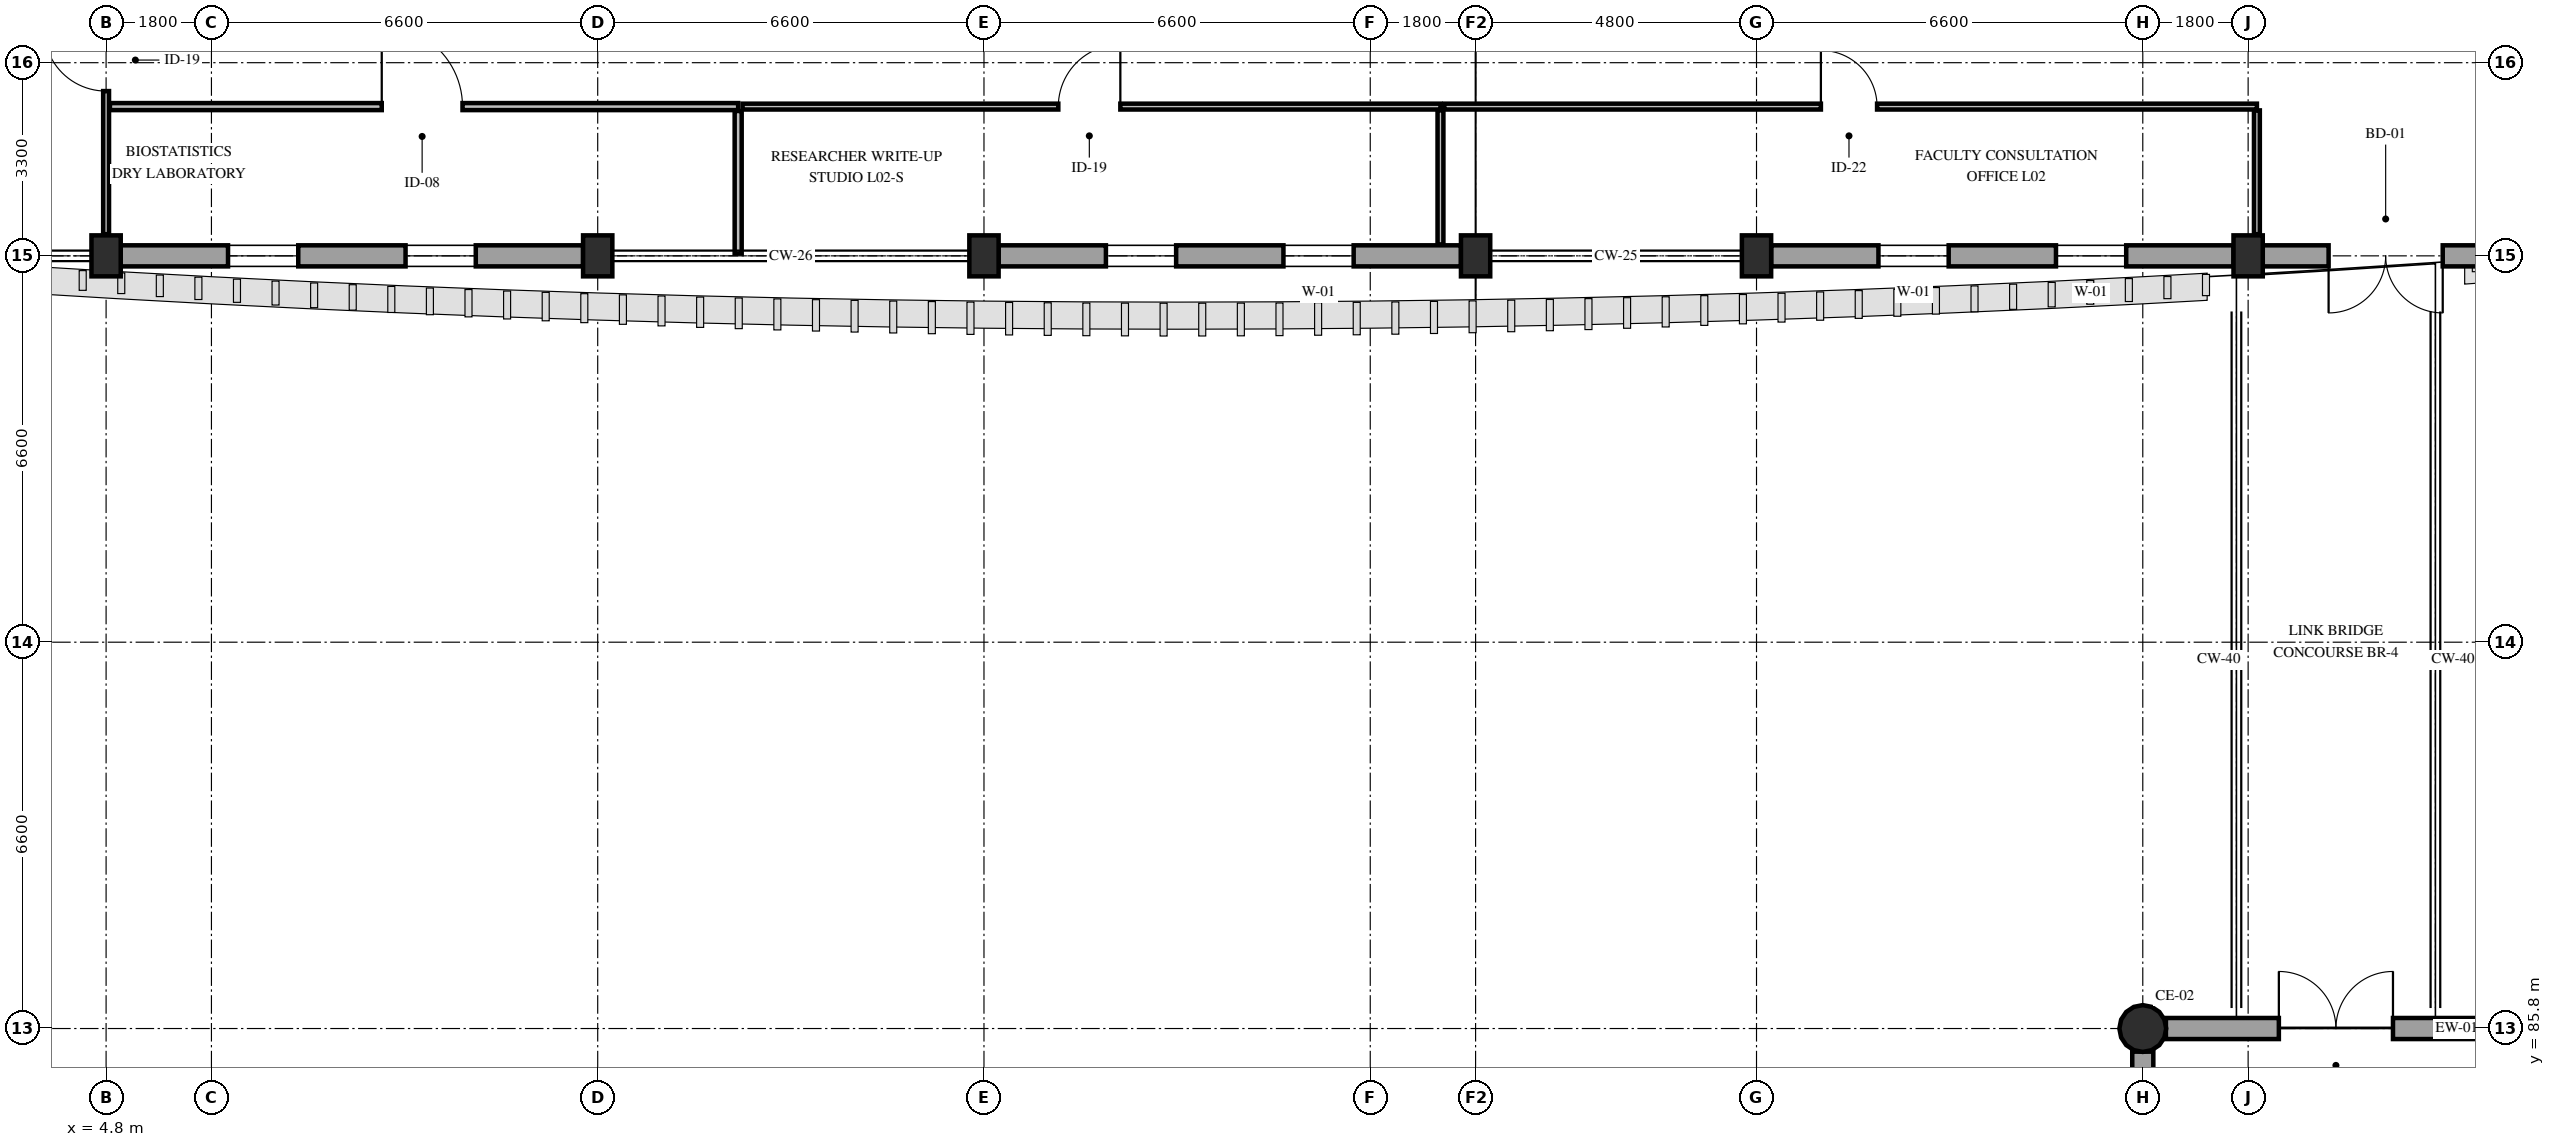
"""IFC4 building model, lengths in metres.
Left out: names, types, materials, properties, quantities, classifications, styles, units other than length and angle.
Written with IfcOpenShell. Run it as: python <this file> out.ifc"""

import sys

from ifc_helpers import new_model, si_unit, direction, frame, frame_2d, origin, origin_2d, place, context, subcontext, project, spatial, rectangle, circle, extrude, element, fill, save


model = new_model("IFC4")
c1 = context("Model", 3, precision=1e-05, world=origin(), true_north=direction((0.0, 1.0)))
c2 = subcontext(c1, "Body", "Model", "MODEL_VIEW")
j1 = project(units=[si_unit("LENGTHUNIT", "METRE"), si_unit("PLANEANGLEUNIT", "RADIAN")], contexts=[c1])
p1 = place(None, origin())
s1 = spatial("IfcSite", under=j1, at=p1, CompositionType="ELEMENT")
p2 = place(p1, origin())
s2 = spatial("IfcBuilding", under=s1, at=p2, CompositionType="ELEMENT")
p3 = place(p2, frame((0.0, 0.0, 10.2)))
s3 = spatial("IfcBuildingStorey", under=s2, at=p3, CompositionType="ELEMENT", Elevation=10.2)
for number, where, z_axis, x_axis in (
    (1, (4.8, 99.0, 0.0), (0.0, 0.0, 1.0), (1.0, 0.0, 0.0)),
    (2, (13.2, 99.0, 0.0), (0.0, 0.0, 1.0), (1.0, 0.0, 0.0)),
    (3, (19.8, 99.0, 0.0), (0.0, 0.0, 1.0), (1.0, 0.0, 0.0)),
    (4, (28.2, 99.0, 0.0), (0.0, 0.0, 1.0), (1.0, 0.0, 0.0)),
    (5, (33.0, 99.0, 0.0), (0.0, 0.0, 1.0), (1.0, 0.0, 0.0)),
    (6, (41.4, 99.0, 0.0), (0.0, 0.0, 1.0), (1.0, 0.0, 0.0)),
):
    element("IfcColumn", number, at=place(p3, frame(where, z_axis=z_axis, x_axis=x_axis)), inside=s3, PredefinedType="PILASTER", context=c2, shape_type="SweptSolid", body=[
        extrude(rectangle(XDim=0.5, YDim=0.7, at=origin_2d()), origin(), (0.0, 0.0, 1.0), 4.8),
    ])
p4 = place(p3, frame((39.6, 85.8, 0.0), z_axis=(0.0, 0.0, 1.0), x_axis=(1.0, 0.0, 0.0)))
e7 = element("IfcColumn", 7, at=p4, inside=s3, PredefinedType="COLUMN", context=c2, shape_type="SweptSolid", body=[
    extrude(circle(Radius=0.4, at=origin_2d()), origin(), (0.0, 0.0, 1.0), 4.8),
])
p5 = place(p3, frame((39.6, 79.595, 0.0), z_axis=(0.0, 0.0, 1.0), x_axis=(0.0, 1.0, 0.0)))
e8 = element("IfcWall", 8, at=p5, inside=s3, PredefinedType="STANDARD", context=c2, shape_type="SweptSolid", body=[
    extrude(rectangle(XDim=5.81, YDim=0.36, at=frame_2d((2.905, 0.0))), origin(), (0.0, 0.0, 1.0), 3.95),
])
p6 = place(p5, frame((1.405, 0.0, 0.85)))
e9 = element("IfcOpeningElement", 9, at=p6, cuts=e8, PredefinedType="OPENING", context=c2, shape_type="SweptSolid", body=[
    extrude(rectangle(XDim=3.0, YDim=1.5, at=frame_2d((1.5, 0.75))), frame((0.0, 0.195, 0.0), z_axis=(0.0, -1.0, 0.0), x_axis=(1.0, 0.0, 0.0)), (0.0, 0.0, 1.0), 0.39),
])
p7 = place(p3, frame((39.995, 85.8, 0.0), z_axis=(0.0, 0.0, 1.0), x_axis=(1.0, 0.0, 0.0)))
e10 = element("IfcWall", 10, at=p7, inside=s3, PredefinedType="STANDARD", context=c2, shape_type="SweptSolid", body=[
    extrude(rectangle(XDim=5.81, YDim=0.36, at=frame_2d((2.905, 0.0))), origin(), (0.0, 0.0, 1.0), 3.95),
])
p8 = place(p7, frame((1.93, 0.0, 0.0)))
e11 = element("IfcOpeningElement", 11, at=p8, cuts=e10, PredefinedType="OPENING", context=c2, shape_type="SweptSolid", body=[
    extrude(rectangle(XDim=1.95, YDim=2.35, at=frame_2d((0.975, 1.175))), frame((0.0, 0.195, 0.0), z_axis=(0.0, -1.0, 0.0), x_axis=(1.0, 0.0, 0.0)), (0.0, 0.0, 1.0), 0.39),
])
p9 = place(p3, frame((45.85, 99.0, 0.0), z_axis=(0.0, 0.0, 1.0), x_axis=(-1.0, 0.0, 0.0)))
e12 = element("IfcWall", 12, at=p9, inside=s3, PredefinedType="STANDARD", context=c2, shape_type="SweptSolid", body=[
    extrude(rectangle(XDim=4.2, YDim=0.36, at=frame_2d((2.1, 0.0))), origin(), (0.0, 0.0, 1.0), 3.95),
])
p10 = place(p9, frame((1.125, 0.0, 0.0)))
e13 = element("IfcOpeningElement", 13, at=p10, cuts=e12, PredefinedType="OPENING", context=c2, shape_type="SweptSolid", body=[
    extrude(rectangle(XDim=1.95, YDim=2.35, at=frame_2d((0.975, 1.175))), frame((0.0, 0.195, 0.0), z_axis=(0.0, -1.0, 0.0), x_axis=(1.0, 0.0, 0.0)), (0.0, 0.0, 1.0), 0.39),
])
p11 = place(p3, frame((41.15, 99.0, 0.0), z_axis=(0.0, 0.0, 1.0), x_axis=(-1.0, 0.0, 0.0)))
e14 = element("IfcWall", 14, at=p11, inside=s3, PredefinedType="STANDARD", context=c2, shape_type="SweptSolid", body=[
    extrude(rectangle(XDim=7.9, YDim=0.36, at=frame_2d((3.95, 0.0))), origin(), (0.0, 0.0, 1.0), 3.93),
])
p12 = place(p11, frame((1.833, 0.0, 0.85)))
e15 = element("IfcOpeningElement", 15, at=p12, cuts=e14, PredefinedType="OPENING", context=c2, shape_type="SweptSolid", body=[
    extrude(rectangle(XDim=1.2, YDim=1.5, at=frame_2d((0.6, 0.75))), frame((0.0, 0.195, 0.0), z_axis=(0.0, -1.0, 0.0), x_axis=(1.0, 0.0, 0.0)), (0.0, 0.0, 1.0), 0.39),
])
p13 = place(p11, frame((4.867, 0.0, 0.85)))
e16 = element("IfcOpeningElement", 16, at=p13, cuts=e14, PredefinedType="OPENING", context=c2, shape_type="SweptSolid", body=[
    extrude(rectangle(XDim=1.2, YDim=1.5, at=frame_2d((0.6, 0.75))), frame((0.0, 0.195, 0.0), z_axis=(0.0, -1.0, 0.0), x_axis=(1.0, 0.0, 0.0)), (0.0, 0.0, 1.0), 0.39),
])
p14 = place(p3, frame((27.95, 99.0, 0.0), z_axis=(0.0, 0.0, 1.0), x_axis=(-1.0, 0.0, 0.0)))
e17 = element("IfcWall", 17, at=p14, inside=s3, PredefinedType="STANDARD", context=c2, shape_type="SweptSolid", body=[
    extrude(rectangle(XDim=7.9, YDim=0.36, at=frame_2d((3.95, 0.0))), origin(), (0.0, 0.0, 1.0), 3.93),
])
p15 = place(p14, frame((1.833, 0.0, 0.85)))
e18 = element("IfcOpeningElement", 18, at=p15, cuts=e17, PredefinedType="OPENING", context=c2, shape_type="SweptSolid", body=[
    extrude(rectangle(XDim=1.2, YDim=1.5, at=frame_2d((0.6, 0.75))), frame((0.0, 0.195, 0.0), z_axis=(0.0, -1.0, 0.0), x_axis=(1.0, 0.0, 0.0)), (0.0, 0.0, 1.0), 0.39),
])
p16 = place(p14, frame((4.867, 0.0, 0.85)))
e19 = element("IfcOpeningElement", 19, at=p16, cuts=e17, PredefinedType="OPENING", context=c2, shape_type="SweptSolid", body=[
    extrude(rectangle(XDim=1.2, YDim=1.5, at=frame_2d((0.6, 0.75))), frame((0.0, 0.195, 0.0), z_axis=(0.0, -1.0, 0.0), x_axis=(1.0, 0.0, 0.0)), (0.0, 0.0, 1.0), 0.39),
])
p17 = place(p3, frame((12.95, 99.0, 0.0), z_axis=(0.0, 0.0, 1.0), x_axis=(-1.0, 0.0, 0.0)))
e20 = element("IfcWall", 20, at=p17, inside=s3, PredefinedType="STANDARD", context=c2, shape_type="SweptSolid", body=[
    extrude(rectangle(XDim=7.9, YDim=0.36, at=frame_2d((3.95, 0.0))), origin(), (0.0, 0.0, 1.0), 3.93),
])
p18 = place(p17, frame((1.833, 0.0, 0.85)))
e21 = element("IfcOpeningElement", 21, at=p18, cuts=e20, PredefinedType="OPENING", context=c2, shape_type="SweptSolid", body=[
    extrude(rectangle(XDim=1.2, YDim=1.5, at=frame_2d((0.6, 0.75))), frame((0.0, 0.195, 0.0), z_axis=(0.0, -1.0, 0.0), x_axis=(1.0, 0.0, 0.0)), (0.0, 0.0, 1.0), 0.39),
])
p19 = place(p17, frame((4.867, 0.0, 0.85)))
e22 = element("IfcOpeningElement", 22, at=p19, cuts=e20, PredefinedType="OPENING", context=c2, shape_type="SweptSolid", body=[
    extrude(rectangle(XDim=1.2, YDim=1.5, at=frame_2d((0.6, 0.75))), frame((0.0, 0.195, 0.0), z_axis=(0.0, -1.0, 0.0), x_axis=(1.0, 0.0, 0.0)), (0.0, 0.0, 1.0), 0.39),
])
p20 = place(p3, frame((4.8, 99.37, 0.0), z_axis=(0.0, 0.0, 1.0), x_axis=(0.0, 1.0, 0.0)))
e23 = element("IfcWall", 23, at=p20, inside=s3, PredefinedType="PARTITIONING", context=c2, shape_type="SweptSolid", body=[
    extrude(rectangle(XDim=3.755, YDim=0.1, at=frame_2d((1.877, 0.0))), origin(), (0.0, 0.0, 1.0), 4.13),
])
p21 = place(p20, frame((2.445, 0.0, 0.0)))
e24 = element("IfcOpeningElement", 24, at=p21, cuts=e23, PredefinedType="OPENING", context=c2, shape_type="SweptSolid", body=[
    extrude(rectangle(XDim=1.06, YDim=2.2, at=frame_2d((0.53, 1.1))), frame((0.0, 0.065, 0.0), z_axis=(0.0, -1.0, 0.0), x_axis=(1.0, 0.0, 0.0)), (0.0, 0.0, 1.0), 0.13),
])
p22 = place(p3, frame((4.865, 101.55, 0.0), z_axis=(0.0, 0.0, 1.0), x_axis=(1.0, 0.0, 0.0)))
e25 = element("IfcWall", 25, at=p22, inside=s3, PredefinedType="PARTITIONING", context=c2, shape_type="SweptSolid", body=[
    extrude(rectangle(XDim=10.735, YDim=0.12, at=frame_2d((5.368, 0.0))), origin(), (0.0, 0.0, 1.0), 4.13),
])
p23 = place(p22, frame((4.645, 0.0, 0.0)))
e26 = element("IfcOpeningElement", 26, at=p23, cuts=e25, PredefinedType="OPENING", context=c2, shape_type="SweptSolid", body=[
    extrude(rectangle(XDim=1.38, YDim=2.25, at=frame_2d((0.69, 1.125))), frame((0.0, 0.075, 0.0), z_axis=(0.0, -1.0, 0.0), x_axis=(1.0, 0.0, 0.0)), (0.0, 0.0, 1.0), 0.15),
])
p24 = place(p3, frame((15.6, 99.04, 0.0), z_axis=(0.0, 0.0, 1.0), x_axis=(0.0, 1.0, 0.0)))
e27 = element("IfcWall", 27, at=p24, inside=s3, PredefinedType="PARTITIONING", context=c2, shape_type="SweptSolid", body=[
    extrude(rectangle(XDim=2.435, YDim=0.12, at=frame_2d((1.218, 0.0))), origin(), (0.0, 0.0, 1.0), 3.93),
])
p25 = place(p3, frame((15.675, 101.55, 0.0), z_axis=(0.0, 0.0, 1.0), x_axis=(1.0, 0.0, 0.0)))
e28 = element("IfcWall", 28, at=p25, inside=s3, PredefinedType="PARTITIONING", context=c2, shape_type="SweptSolid", body=[
    extrude(rectangle(XDim=11.925, YDim=0.1, at=frame_2d((5.962, 0.0))), origin(), (0.0, 0.0, 1.0), 4.13),
])
p26 = place(p25, frame((5.395, 0.0, 0.0)))
e29 = element("IfcOpeningElement", 29, at=p26, cuts=e28, PredefinedType="OPENING", context=c2, shape_type="SweptSolid", body=[
    extrude(rectangle(XDim=1.06, YDim=2.2, at=frame_2d((0.53, 1.1))), frame((0.0, 0.065, 0.0), z_axis=(0.0, -1.0, 0.0), x_axis=(1.0, 0.0, 0.0)), (0.0, 0.0, 1.0), 0.13),
])
p27 = place(p3, frame((27.6, 99.195, 0.0), z_axis=(0.0, 0.0, 1.0), x_axis=(0.0, 1.0, 0.0)))
e30 = element("IfcWall", 30, at=p27, inside=s3, PredefinedType="PARTITIONING", context=c2, shape_type="SweptSolid", body=[
    extrude(rectangle(XDim=2.29, YDim=0.1, at=frame_2d((1.145, 0.0))), origin(), (0.0, 0.0, 1.0), 3.93),
])
p28 = place(p3, frame((27.665, 101.55, 0.0), z_axis=(0.0, 0.0, 1.0), x_axis=(1.0, 0.0, 0.0)))
e31 = element("IfcWall", 31, at=p28, inside=s3, PredefinedType="PARTITIONING", context=c2, shape_type="SweptSolid", body=[
    extrude(rectangle(XDim=13.885, YDim=0.1, at=frame_2d((6.942, 0.0))), origin(), (0.0, 0.0, 1.0), 4.13),
])
p29 = place(p28, frame((6.435, 0.0, 0.0)))
e32 = element("IfcOpeningElement", 32, at=p29, cuts=e31, PredefinedType="OPENING", context=c2, shape_type="SweptSolid", body=[
    extrude(rectangle(XDim=0.96, YDim=2.15, at=frame_2d((0.48, 1.075))), frame((0.0, 0.065, 0.0), z_axis=(0.0, -1.0, 0.0), x_axis=(1.0, 0.0, 0.0)), (0.0, 0.0, 1.0), 0.13),
])
p30 = place(p3, frame((41.55, 99.37, 0.0), z_axis=(0.0, 0.0, 1.0), x_axis=(0.0, 1.0, 0.0)))
e33 = element("IfcWall", 33, at=p30, inside=s3, PredefinedType="PARTITIONING", context=c2, shape_type="SweptSolid", body=[
    extrude(rectangle(XDim=2.115, YDim=0.1, at=frame_2d((1.058, 0.0))), origin(), (0.0, 0.0, 1.0), 4.13),
])
p31 = place(p8, origin())
e34 = element("IfcDoor", 34, at=p31, inside=s3, OperationType="DOUBLE_DOOR_SINGLE_SWING", PredefinedType="DOOR", context=c2, shape_type="SweptSolid", body=[
    extrude(rectangle(XDim=1.95, YDim=2.35, at=frame_2d((0.975, 1.175))), frame((0.0, 0.025, 0.0), z_axis=(0.0, -1.0, 0.0), x_axis=(1.0, 0.0, 0.0)), (0.0, 0.0, 1.0), 0.05),
])
fill(e11, e34)
p32 = place(p10, origin())
e35 = element("IfcDoor", 35, at=p32, inside=s3, OperationType="DOUBLE_DOOR_SINGLE_SWING", PredefinedType="DOOR", context=c2, shape_type="SweptSolid", body=[
    extrude(rectangle(XDim=1.95, YDim=2.35, at=frame_2d((0.975, 1.175))), frame((0.0, 0.025, 0.0), z_axis=(0.0, -1.0, 0.0), x_axis=(1.0, 0.0, 0.0)), (0.0, 0.0, 1.0), 0.05),
])
fill(e13, e35)
p33 = place(p12, origin())
e36 = element("IfcWindow", 36, at=p33, inside=s3, PartitioningType="SINGLE_PANEL", PredefinedType="WINDOW", context=c2, shape_type="SweptSolid", body=[
    extrude(rectangle(XDim=1.2, YDim=1.5, at=frame_2d((0.6, 0.75))), frame((0.0, 0.03, 0.0), z_axis=(0.0, -1.0, 0.0), x_axis=(1.0, 0.0, 0.0)), (0.0, 0.0, 1.0), 0.06),
])
fill(e15, e36)
p34 = place(p13, origin())
e37 = element("IfcWindow", 37, at=p34, inside=s3, PartitioningType="SINGLE_PANEL", PredefinedType="WINDOW", context=c2, shape_type="SweptSolid", body=[
    extrude(rectangle(XDim=1.2, YDim=1.5, at=frame_2d((0.6, 0.75))), frame((0.0, 0.03, 0.0), z_axis=(0.0, -1.0, 0.0), x_axis=(1.0, 0.0, 0.0)), (0.0, 0.0, 1.0), 0.06),
])
fill(e16, e37)
p35 = place(p15, origin())
e38 = element("IfcWindow", 38, at=p35, inside=s3, PartitioningType="SINGLE_PANEL", PredefinedType="WINDOW", context=c2, shape_type="SweptSolid", body=[
    extrude(rectangle(XDim=1.2, YDim=1.5, at=frame_2d((0.6, 0.75))), frame((0.0, 0.03, 0.0), z_axis=(0.0, -1.0, 0.0), x_axis=(1.0, 0.0, 0.0)), (0.0, 0.0, 1.0), 0.06),
])
fill(e18, e38)
p36 = place(p16, origin())
e39 = element("IfcWindow", 39, at=p36, inside=s3, PartitioningType="SINGLE_PANEL", PredefinedType="WINDOW", context=c2, shape_type="SweptSolid", body=[
    extrude(rectangle(XDim=1.2, YDim=1.5, at=frame_2d((0.6, 0.75))), frame((0.0, 0.03, 0.0), z_axis=(0.0, -1.0, 0.0), x_axis=(1.0, 0.0, 0.0)), (0.0, 0.0, 1.0), 0.06),
])
fill(e19, e39)
p37 = place(p18, origin())
e40 = element("IfcWindow", 40, at=p37, inside=s3, PartitioningType="SINGLE_PANEL", PredefinedType="WINDOW", context=c2, shape_type="SweptSolid", body=[
    extrude(rectangle(XDim=1.2, YDim=1.5, at=frame_2d((0.6, 0.75))), frame((0.0, 0.03, 0.0), z_axis=(0.0, -1.0, 0.0), x_axis=(1.0, 0.0, 0.0)), (0.0, 0.0, 1.0), 0.06),
])
fill(e21, e40)
p38 = place(p19, origin())
e41 = element("IfcWindow", 41, at=p38, inside=s3, PartitioningType="SINGLE_PANEL", PredefinedType="WINDOW", context=c2, shape_type="SweptSolid", body=[
    extrude(rectangle(XDim=1.2, YDim=1.5, at=frame_2d((0.6, 0.75))), frame((0.0, 0.03, 0.0), z_axis=(0.0, -1.0, 0.0), x_axis=(1.0, 0.0, 0.0)), (0.0, 0.0, 1.0), 0.06),
])
fill(e22, e41)
p39 = place(p21, origin())
e42 = element("IfcDoor", 42, at=p39, inside=s3, OperationType="SINGLE_SWING_RIGHT", PredefinedType="DOOR", context=c2, shape_type="SweptSolid", body=[
    extrude(rectangle(XDim=1.06, YDim=2.2, at=frame_2d((0.53, 1.1))), frame((0.0, 0.025, 0.0), z_axis=(0.0, -1.0, 0.0), x_axis=(1.0, 0.0, 0.0)), (0.0, 0.0, 1.0), 0.05),
])
fill(e24, e42)
p40 = place(p23, origin())
e43 = element("IfcDoor", 43, at=p40, inside=s3, OperationType="SINGLE_SWING_LEFT", PredefinedType="DOOR", context=c2, shape_type="SweptSolid", body=[
    extrude(rectangle(XDim=1.38, YDim=2.25, at=frame_2d((0.69, 1.125))), frame((0.0, 0.025, 0.0), z_axis=(0.0, -1.0, 0.0), x_axis=(1.0, 0.0, 0.0)), (0.0, 0.0, 1.0), 0.05),
])
fill(e26, e43)
p41 = place(p26, origin())
e44 = element("IfcDoor", 44, at=p41, inside=s3, OperationType="SINGLE_SWING_RIGHT", PredefinedType="DOOR", context=c2, shape_type="SweptSolid", body=[
    extrude(rectangle(XDim=1.06, YDim=2.2, at=frame_2d((0.53, 1.1))), frame((0.0, 0.025, 0.0), z_axis=(0.0, -1.0, 0.0), x_axis=(1.0, 0.0, 0.0)), (0.0, 0.0, 1.0), 0.05),
])
fill(e29, e44)
p42 = place(p29, origin())
e45 = element("IfcDoor", 45, at=p42, inside=s3, OperationType="SINGLE_SWING_LEFT", PredefinedType="DOOR", context=c2, shape_type="SweptSolid", body=[
    extrude(rectangle(XDim=0.96, YDim=2.15, at=frame_2d((0.48, 1.075))), frame((0.0, 0.025, 0.0), z_axis=(0.0, -1.0, 0.0), x_axis=(1.0, 0.0, 0.0)), (0.0, 0.0, 1.0), 0.05),
])
fill(e32, e45)
save(model, sys.argv[1])
